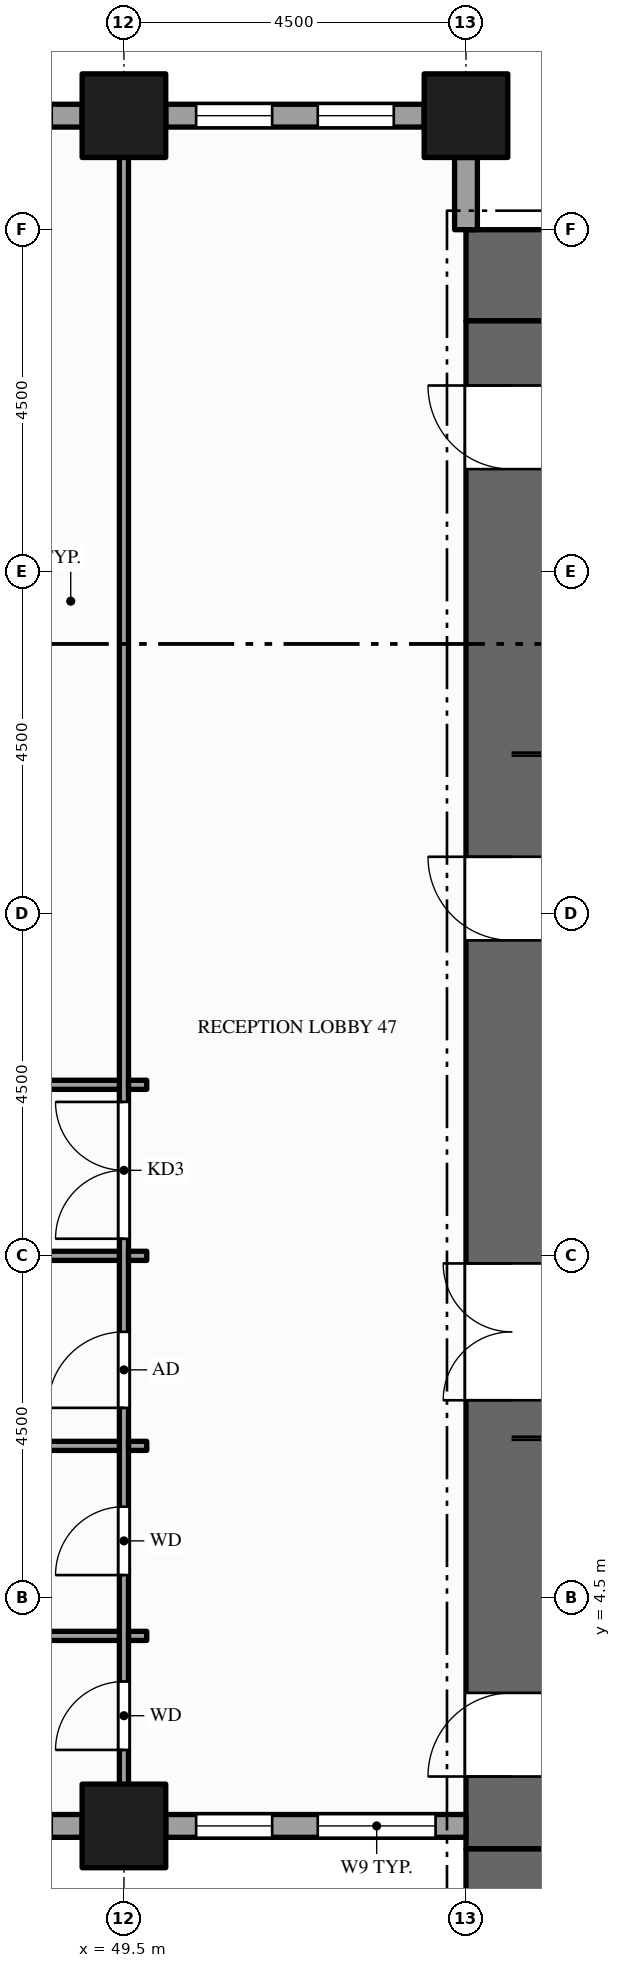
"""IFC4 building model, lengths in metres.
Left out: names, types, materials, properties, quantities, classifications, styles, units other than length and angle.
Written with IfcOpenShell. Run it as: python <this file> out.ifc"""

import sys

from ifc_helpers import new_model, si_unit, direction, frame, frame_2d, origin, origin_2d, place, context, subcontext, project, spatial, rectangle, hollow_rectangle, extrude, element, fill, save


model = new_model("IFC4")
c1 = context("Model", 3, precision=1e-05, world=origin(), true_north=direction((0.0, 1.0)))
c2 = subcontext(c1, "Body", "Model", "MODEL_VIEW")
j1 = project(units=[si_unit("LENGTHUNIT", "METRE"), si_unit("PLANEANGLEUNIT", "RADIAN")], contexts=[c1])
p1 = place(None, origin())
s1 = spatial("IfcSite", under=j1, at=p1, CompositionType="ELEMENT")
p2 = place(p1, origin())
s2 = spatial("IfcBuilding", under=s1, at=p2, CompositionType="ELEMENT")
p3 = place(p2, frame((0.0, 0.0, 33.0)))
s3 = spatial("IfcBuildingStorey", under=s2, at=p3, CompositionType="ELEMENT", Elevation=33.0)
for number, where, z_axis, x_axis in (
    (1, (67.5, 0.6, -0.15), (0.0, 0.0, 1.0), (-1.0, 0.0, 0.0)),
    (2, (54.0, 21.9, -0.15), (0.0, 0.0, 1.0), (1.0, 0.0, 0.0)),
):
    element("IfcWall", number, at=place(p3, frame(where, z_axis=z_axis, x_axis=x_axis)), inside=s3, PredefinedType="SHEAR", context=c2, shape_type="SweptSolid", body=[
        extrude(rectangle(XDim=13.5, YDim=1.2, at=frame_2d((6.75, 0.0))), origin(), (0.0, 0.0, 1.0), 4.0),
    ])
p4 = place(p3, frame((54.6, 1.2, -0.15), z_axis=(0.0, 0.0, 1.0), x_axis=(0.0, 1.0, 0.0)))
e3 = element("IfcWall", 3, at=p4, inside=s3, PredefinedType="SHEAR", context=c2, shape_type="SweptSolid", body=[
    extrude(rectangle(XDim=20.1, YDim=1.2, at=frame_2d((10.05, 0.0))), origin(), (0.0, 0.0, 1.0), 4.0),
])
p5 = place(p4, frame((5.9, 0.0, 0.15)))
e4 = element("IfcOpeningElement", 4, at=p5, cuts=e3, PredefinedType="OPENING", context=c2, shape_type="SweptSolid", body=[
    extrude(rectangle(XDim=1.8, YDim=2.1, at=frame_2d((0.9, 1.05))), frame((0.0, 0.61, 0.0), z_axis=(0.0, -1.0, 0.0), x_axis=(1.0, 0.0, 0.0)), (0.0, 0.0, 1.0), 1.22),
])
p6 = place(p4, frame((11.95, 0.0, 0.15)))
e5 = element("IfcOpeningElement", 5, at=p6, cuts=e3, PredefinedType="OPENING", context=c2, shape_type="SweptSolid", body=[
    extrude(rectangle(XDim=1.1, YDim=2.1, at=frame_2d((0.55, 1.05))), frame((0.0, 0.61, 0.0), z_axis=(0.0, -1.0, 0.0), x_axis=(1.0, 0.0, 0.0)), (0.0, 0.0, 1.0), 1.22),
])
p7 = place(p4, frame((0.95, 0.0, 0.15)))
e6 = element("IfcOpeningElement", 6, at=p7, cuts=e3, PredefinedType="OPENING", context=c2, shape_type="SweptSolid", body=[
    extrude(rectangle(XDim=1.1, YDim=2.1, at=frame_2d((0.55, 1.05))), frame((0.0, 0.61, 0.0), z_axis=(0.0, -1.0, 0.0), x_axis=(1.0, 0.0, 0.0)), (0.0, 0.0, 1.0), 1.22),
])
p8 = place(p4, frame((18.15, 0.0, 0.15)))
e7 = element("IfcOpeningElement", 7, at=p8, cuts=e3, PredefinedType="OPENING", context=c2, shape_type="SweptSolid", body=[
    extrude(rectangle(XDim=1.1, YDim=2.1, at=frame_2d((0.55, 1.05))), frame((0.0, 0.61, 0.0), z_axis=(0.0, -1.0, 0.0), x_axis=(1.0, 0.0, 0.0)), (0.0, 0.0, 1.0), 1.22),
])
for number, where, z_axis, x_axis in (
    (8, (49.5, 1.5, -0.15), (0.0, 0.0, 1.0), (1.0, 0.0, 0.0)),
    (9, (49.5, 24.0, -0.15), (0.0, 0.0, 1.0), (1.0, 0.0, 0.0)),
    (10, (54.0, 24.0, -0.15), (0.0, 0.0, 1.0), (1.0, 0.0, 0.0)),
):
    element("IfcColumn", number, at=place(p3, frame(where, z_axis=z_axis, x_axis=x_axis)), inside=s3, PredefinedType="COLUMN", context=c2, shape_type="SweptSolid", body=[
        extrude(hollow_rectangle(XDim=1.1, YDim=1.1, WallThickness=0.06, at=origin_2d()), origin(), (0.0, 0.0, 1.0), 4.0),
    ])
p9 = place(p3, frame((45.55, 1.5, 0.0), z_axis=(0.0, 0.0, 1.0), x_axis=(1.0, 0.0, 0.0)))
e11 = element("IfcWall", 11, at=p9, inside=s3, PredefinedType="STANDARD", context=c2, shape_type="SweptSolid", body=[
    extrude(rectangle(XDim=3.4, YDim=0.3, at=frame_2d((1.7, 0.0))), origin(), (0.0, 0.0, 1.0), 3.144),
])
p10 = place(p9, frame((0.4, 0.0, 0.9)))
e12 = element("IfcOpeningElement", 12, at=p10, cuts=e11, PredefinedType="OPENING", context=c2, shape_type="SweptSolid", body=[
    extrude(rectangle(XDim=1.0, YDim=2.0, at=frame_2d((0.5, 1.0))), frame((0.0, 0.16, 0.0), z_axis=(0.0, -1.0, 0.0), x_axis=(1.0, 0.0, 0.0)), (0.0, 0.0, 1.0), 0.32),
])
p11 = place(p9, frame((2.0, 0.0, 0.9)))
e13 = element("IfcOpeningElement", 13, at=p11, cuts=e11, PredefinedType="OPENING", context=c2, shape_type="SweptSolid", body=[
    extrude(rectangle(XDim=1.0, YDim=2.0, at=frame_2d((0.5, 1.0))), frame((0.0, 0.16, 0.0), z_axis=(0.0, -1.0, 0.0), x_axis=(1.0, 0.0, 0.0)), (0.0, 0.0, 1.0), 0.32),
])
p12 = place(p3, frame((50.05, 1.5, 0.0), z_axis=(0.0, 0.0, 1.0), x_axis=(1.0, 0.0, 0.0)))
e14 = element("IfcWall", 14, at=p12, inside=s3, PredefinedType="STANDARD", context=c2, shape_type="SweptSolid", body=[
    extrude(rectangle(XDim=3.95, YDim=0.3, at=frame_2d((1.975, 0.0))), origin(), (0.0, 0.0, 1.0), 3.144),
])
p13 = place(p12, frame((0.4, 0.0, 0.9)))
e15 = element("IfcOpeningElement", 15, at=p13, cuts=e14, PredefinedType="OPENING", context=c2, shape_type="SweptSolid", body=[
    extrude(rectangle(XDim=1.0, YDim=2.0, at=frame_2d((0.5, 1.0))), frame((0.0, 0.16, 0.0), z_axis=(0.0, -1.0, 0.0), x_axis=(1.0, 0.0, 0.0)), (0.0, 0.0, 1.0), 0.32),
])
p14 = place(p12, frame((2.0, 0.0, 0.9)))
e16 = element("IfcOpeningElement", 16, at=p14, cuts=e14, PredefinedType="OPENING", context=c2, shape_type="SweptSolid", body=[
    extrude(rectangle(XDim=1.55, YDim=2.0, at=frame_2d((0.775, 1.0))), frame((0.0, 0.16, 0.0), z_axis=(0.0, -1.0, 0.0), x_axis=(1.0, 0.0, 0.0)), (0.0, 0.0, 1.0), 0.32),
])
p15 = place(p3, frame((54.0, 22.5, 0.0), z_axis=(0.0, 0.0, 1.0), x_axis=(0.0, 1.0, 0.0)))
e17 = element("IfcWall", 17, at=p15, inside=s3, PredefinedType="STANDARD", context=c2, shape_type="SweptSolid", body=[
    extrude(rectangle(XDim=0.95, YDim=0.3, at=frame_2d((0.475, 0.0))), origin(), (0.0, 0.0, 1.0), 3.144),
])
p16 = place(p3, frame((53.45, 24.0, 0.0), z_axis=(0.0, 0.0, 1.0), x_axis=(-1.0, 0.0, 0.0)))
e18 = element("IfcWall", 18, at=p16, inside=s3, PredefinedType="STANDARD", context=c2, shape_type="SweptSolid", body=[
    extrude(rectangle(XDim=3.4, YDim=0.3, at=frame_2d((1.7, 0.0))), origin(), (0.0, 0.0, 1.0), 3.144),
])
p17 = place(p16, frame((0.4, 0.0, 0.9)))
e19 = element("IfcOpeningElement", 19, at=p17, cuts=e18, PredefinedType="OPENING", context=c2, shape_type="SweptSolid", body=[
    extrude(rectangle(XDim=1.0, YDim=2.0, at=frame_2d((0.5, 1.0))), frame((0.0, 0.16, 0.0), z_axis=(0.0, -1.0, 0.0), x_axis=(1.0, 0.0, 0.0)), (0.0, 0.0, 1.0), 0.32),
])
p18 = place(p16, frame((2.0, 0.0, 0.9)))
e20 = element("IfcOpeningElement", 20, at=p18, cuts=e18, PredefinedType="OPENING", context=c2, shape_type="SweptSolid", body=[
    extrude(rectangle(XDim=1.0, YDim=2.0, at=frame_2d((0.5, 1.0))), frame((0.0, 0.16, 0.0), z_axis=(0.0, -1.0, 0.0), x_axis=(1.0, 0.0, 0.0)), (0.0, 0.0, 1.0), 0.32),
])
p19 = place(p3, frame((48.95, 24.0, 0.0), z_axis=(0.0, 0.0, 1.0), x_axis=(-1.0, 0.0, 0.0)))
e21 = element("IfcWall", 21, at=p19, inside=s3, PredefinedType="STANDARD", context=c2, shape_type="SweptSolid", body=[
    extrude(rectangle(XDim=3.4, YDim=0.3, at=frame_2d((1.7, 0.0))), origin(), (0.0, 0.0, 1.0), 3.144),
])
p20 = place(p19, frame((0.4, 0.0, 0.9)))
e22 = element("IfcOpeningElement", 22, at=p20, cuts=e21, PredefinedType="OPENING", context=c2, shape_type="SweptSolid", body=[
    extrude(rectangle(XDim=1.0, YDim=2.0, at=frame_2d((0.5, 1.0))), frame((0.0, 0.16, 0.0), z_axis=(0.0, -1.0, 0.0), x_axis=(1.0, 0.0, 0.0)), (0.0, 0.0, 1.0), 0.32),
])
p21 = place(p19, frame((2.0, 0.0, 0.9)))
e23 = element("IfcOpeningElement", 23, at=p21, cuts=e21, PredefinedType="OPENING", context=c2, shape_type="SweptSolid", body=[
    extrude(rectangle(XDim=1.0, YDim=2.0, at=frame_2d((0.5, 1.0))), frame((0.0, 0.16, 0.0), z_axis=(0.0, -1.0, 0.0), x_axis=(1.0, 0.0, 0.0)), (0.0, 0.0, 1.0), 0.32),
])
p22 = place(p3, frame((49.5, 1.65, 0.0), z_axis=(0.0, 0.0, 1.0), x_axis=(0.0, 1.0, 0.0)))
e24 = element("IfcWall", 24, at=p22, inside=s3, PredefinedType="PARTITIONING", context=c2, shape_type="SweptSolid", body=[
    extrude(rectangle(XDim=22.2, YDim=0.12, at=frame_2d((11.1, 0.0))), origin(), (0.0, 0.0, 1.0), 2.938),
])
p23 = place(p22, frame((7.575, 0.0, 0.0)))
e25 = element("IfcOpeningElement", 25, at=p23, cuts=e24, PredefinedType="OPENING", context=c2, shape_type="SweptSolid", body=[
    extrude(rectangle(XDim=1.8, YDim=2.1, at=frame_2d((0.9, 1.05))), frame((0.0, 0.07, 0.0), z_axis=(0.0, -1.0, 0.0), x_axis=(1.0, 0.0, 0.0)), (0.0, 0.0, 1.0), 0.14),
])
p24 = place(p22, frame((0.85, 0.0, 0.0)))
e26 = element("IfcOpeningElement", 26, at=p24, cuts=e24, PredefinedType="OPENING", context=c2, shape_type="SweptSolid", body=[
    extrude(rectangle(XDim=0.9, YDim=2.1, at=frame_2d((0.45, 1.05))), frame((0.0, 0.07, 0.0), z_axis=(0.0, -1.0, 0.0), x_axis=(1.0, 0.0, 0.0)), (0.0, 0.0, 1.0), 0.14),
])
p25 = place(p22, frame((3.15, 0.0, 0.0)))
e27 = element("IfcOpeningElement", 27, at=p25, cuts=e24, PredefinedType="OPENING", context=c2, shape_type="SweptSolid", body=[
    extrude(rectangle(XDim=0.9, YDim=2.1, at=frame_2d((0.45, 1.05))), frame((0.0, 0.07, 0.0), z_axis=(0.0, -1.0, 0.0), x_axis=(1.0, 0.0, 0.0)), (0.0, 0.0, 1.0), 0.14),
])
p26 = place(p22, frame((5.35, 0.0, 0.0)))
e28 = element("IfcOpeningElement", 28, at=p26, cuts=e24, PredefinedType="OPENING", context=c2, shape_type="SweptSolid", body=[
    extrude(rectangle(XDim=1.0, YDim=2.1, at=frame_2d((0.5, 1.05))), frame((0.0, 0.07, 0.0), z_axis=(0.0, -1.0, 0.0), x_axis=(1.0, 0.0, 0.0)), (0.0, 0.0, 1.0), 0.14),
])
p27 = place(p3, frame((45.06, 4.0, 0.0), z_axis=(0.0, 0.0, 1.0), x_axis=(1.0, 0.0, 0.0)))
e29 = element("IfcWall", 29, at=p27, inside=s3, PredefinedType="PARTITIONING", context=c2, shape_type="SweptSolid", body=[
    extrude(rectangle(XDim=4.38, YDim=0.12, at=frame_2d((2.19, 0.0))), origin(), (0.0, 0.0, 1.0), 2.938),
])
p28 = place(p3, frame((49.56, 4.0, 0.0), z_axis=(0.0, 0.0, 1.0), x_axis=(1.0, 0.0, 0.0)))
e30 = element("IfcWall", 30, at=p28, inside=s3, PredefinedType="PARTITIONING", context=c2, shape_type="SweptSolid", body=[
    extrude(rectangle(XDim=0.24, YDim=0.12, at=frame_2d((0.12, 0.0))), origin(), (0.0, 0.0, 1.0), 2.938),
])
p29 = place(p3, frame((45.06, 6.5, 0.0), z_axis=(0.0, 0.0, 1.0), x_axis=(1.0, 0.0, 0.0)))
e31 = element("IfcWall", 31, at=p29, inside=s3, PredefinedType="PARTITIONING", context=c2, shape_type="SweptSolid", body=[
    extrude(rectangle(XDim=4.38, YDim=0.12, at=frame_2d((2.19, 0.0))), origin(), (0.0, 0.0, 1.0), 2.938),
])
p30 = place(p3, frame((49.56, 6.5, 0.0), z_axis=(0.0, 0.0, 1.0), x_axis=(1.0, 0.0, 0.0)))
e32 = element("IfcWall", 32, at=p30, inside=s3, PredefinedType="PARTITIONING", context=c2, shape_type="SweptSolid", body=[
    extrude(rectangle(XDim=0.24, YDim=0.12, at=frame_2d((0.12, 0.0))), origin(), (0.0, 0.0, 1.0), 2.938),
])
p31 = place(p3, frame((45.06, 9.0, 0.0), z_axis=(0.0, 0.0, 1.0), x_axis=(1.0, 0.0, 0.0)))
e33 = element("IfcWall", 33, at=p31, inside=s3, PredefinedType="PARTITIONING", context=c2, shape_type="SweptSolid", body=[
    extrude(rectangle(XDim=4.38, YDim=0.12, at=frame_2d((2.19, 0.0))), origin(), (0.0, 0.0, 1.0), 2.938),
])
p32 = place(p3, frame((49.56, 9.0, 0.0), z_axis=(0.0, 0.0, 1.0), x_axis=(1.0, 0.0, 0.0)))
e34 = element("IfcWall", 34, at=p32, inside=s3, PredefinedType="PARTITIONING", context=c2, shape_type="SweptSolid", body=[
    extrude(rectangle(XDim=0.24, YDim=0.12, at=frame_2d((0.12, 0.0))), origin(), (0.0, 0.0, 1.0), 2.938),
])
p33 = place(p3, frame((45.06, 11.25, 0.0), z_axis=(0.0, 0.0, 1.0), x_axis=(1.0, 0.0, 0.0)))
e35 = element("IfcWall", 35, at=p33, inside=s3, PredefinedType="PARTITIONING", context=c2, shape_type="SweptSolid", body=[
    extrude(rectangle(XDim=4.38, YDim=0.12, at=frame_2d((2.19, 0.0))), origin(), (0.0, 0.0, 1.0), 2.938),
])
p34 = place(p33, frame((1.59, 0.0, 0.0)))
e36 = element("IfcOpeningElement", 36, at=p34, cuts=e35, PredefinedType="OPENING", context=c2, shape_type="SweptSolid", body=[
    extrude(rectangle(XDim=1.2, YDim=2.1, at=frame_2d((0.6, 1.05))), frame((0.0, 0.07, 0.0), z_axis=(0.0, -1.0, 0.0), x_axis=(1.0, 0.0, 0.0)), (0.0, 0.0, 1.0), 0.14),
])
p35 = place(p3, frame((49.56, 11.25, 0.0), z_axis=(0.0, 0.0, 1.0), x_axis=(1.0, 0.0, 0.0)))
e37 = element("IfcWall", 37, at=p35, inside=s3, PredefinedType="PARTITIONING", context=c2, shape_type="SweptSolid", body=[
    extrude(rectangle(XDim=0.24, YDim=0.12, at=frame_2d((0.12, 0.0))), origin(), (0.0, 0.0, 1.0), 2.938),
])
p36 = place(p13, origin())
e38 = element("IfcWindow", 38, at=p36, inside=s3, PartitioningType="SINGLE_PANEL", PredefinedType="WINDOW", context=c2, shape_type="SweptSolid", body=[
    extrude(rectangle(XDim=1.0, YDim=2.0, at=frame_2d((0.5, 1.0))), frame((0.0, 0.03, 0.0), z_axis=(0.0, -1.0, 0.0), x_axis=(1.0, 0.0, 0.0)), (0.0, 0.0, 1.0), 0.06),
])
fill(e15, e38)
p37 = place(p14, origin())
e39 = element("IfcWindow", 39, at=p37, inside=s3, PartitioningType="SINGLE_PANEL", PredefinedType="WINDOW", context=c2, shape_type="SweptSolid", body=[
    extrude(rectangle(XDim=1.55, YDim=2.0, at=frame_2d((0.775, 1.0))), frame((0.0, 0.03, 0.0), z_axis=(0.0, -1.0, 0.0), x_axis=(1.0, 0.0, 0.0)), (0.0, 0.0, 1.0), 0.06),
])
fill(e16, e39)
p38 = place(p17, origin())
e40 = element("IfcWindow", 40, at=p38, inside=s3, PartitioningType="SINGLE_PANEL", PredefinedType="WINDOW", context=c2, shape_type="SweptSolid", body=[
    extrude(rectangle(XDim=1.0, YDim=2.0, at=frame_2d((0.5, 1.0))), frame((0.0, 0.03, 0.0), z_axis=(0.0, -1.0, 0.0), x_axis=(1.0, 0.0, 0.0)), (0.0, 0.0, 1.0), 0.06),
])
fill(e19, e40)
p39 = place(p18, origin())
e41 = element("IfcWindow", 41, at=p39, inside=s3, PartitioningType="SINGLE_PANEL", PredefinedType="WINDOW", context=c2, shape_type="SweptSolid", body=[
    extrude(rectangle(XDim=1.0, YDim=2.0, at=frame_2d((0.5, 1.0))), frame((0.0, 0.03, 0.0), z_axis=(0.0, -1.0, 0.0), x_axis=(1.0, 0.0, 0.0)), (0.0, 0.0, 1.0), 0.06),
])
fill(e20, e41)
p40 = place(p5, origin())
e42 = element("IfcDoor", 42, at=p40, inside=s3, OperationType="DOUBLE_DOOR_SINGLE_SWING", PredefinedType="DOOR", context=c2, shape_type="SweptSolid", body=[
    extrude(rectangle(XDim=1.8, YDim=2.1, at=frame_2d((0.9, 1.05))), frame((0.0, 0.025, 0.0), z_axis=(0.0, -1.0, 0.0), x_axis=(1.0, 0.0, 0.0)), (0.0, 0.0, 1.0), 0.05),
])
fill(e4, e42)
p41 = place(p6, origin())
e43 = element("IfcDoor", 43, at=p41, inside=s3, OperationType="SINGLE_SWING_RIGHT", PredefinedType="DOOR", context=c2, shape_type="SweptSolid", body=[
    extrude(rectangle(XDim=1.1, YDim=2.1, at=frame_2d((0.55, 1.05))), frame((0.0, 0.025, 0.0), z_axis=(0.0, -1.0, 0.0), x_axis=(1.0, 0.0, 0.0)), (0.0, 0.0, 1.0), 0.05),
])
fill(e5, e43)
p42 = place(p7, origin())
e44 = element("IfcDoor", 44, at=p42, inside=s3, OperationType="SINGLE_SWING_LEFT", PredefinedType="DOOR", context=c2, shape_type="SweptSolid", body=[
    extrude(rectangle(XDim=1.1, YDim=2.1, at=frame_2d((0.55, 1.05))), frame((0.0, 0.025, 0.0), z_axis=(0.0, -1.0, 0.0), x_axis=(1.0, 0.0, 0.0)), (0.0, 0.0, 1.0), 0.05),
])
fill(e6, e44)
p43 = place(p8, origin())
e45 = element("IfcDoor", 45, at=p43, inside=s3, OperationType="SINGLE_SWING_RIGHT", PredefinedType="DOOR", context=c2, shape_type="SweptSolid", body=[
    extrude(rectangle(XDim=1.1, YDim=2.1, at=frame_2d((0.55, 1.05))), frame((0.0, 0.025, 0.0), z_axis=(0.0, -1.0, 0.0), x_axis=(1.0, 0.0, 0.0)), (0.0, 0.0, 1.0), 0.05),
])
fill(e7, e45)
p44 = place(p23, origin())
e46 = element("IfcDoor", 46, at=p44, inside=s3, OperationType="DOUBLE_DOOR_SINGLE_SWING", PredefinedType="DOOR", context=c2, shape_type="SweptSolid", body=[
    extrude(rectangle(XDim=1.8, YDim=2.1, at=frame_2d((0.9, 1.05))), frame((0.0, 0.025, 0.0), z_axis=(0.0, -1.0, 0.0), x_axis=(1.0, 0.0, 0.0)), (0.0, 0.0, 1.0), 0.05),
])
fill(e25, e46)
p45 = place(p24, origin())
e47 = element("IfcDoor", 47, at=p45, inside=s3, OperationType="SINGLE_SWING_LEFT", PredefinedType="DOOR", context=c2, shape_type="SweptSolid", body=[
    extrude(rectangle(XDim=0.9, YDim=2.1, at=frame_2d((0.45, 1.05))), frame((0.0, 0.025, 0.0), z_axis=(0.0, -1.0, 0.0), x_axis=(1.0, 0.0, 0.0)), (0.0, 0.0, 1.0), 0.05),
])
fill(e26, e47)
p46 = place(p25, origin())
e48 = element("IfcDoor", 48, at=p46, inside=s3, OperationType="SINGLE_SWING_LEFT", PredefinedType="DOOR", context=c2, shape_type="SweptSolid", body=[
    extrude(rectangle(XDim=0.9, YDim=2.1, at=frame_2d((0.45, 1.05))), frame((0.0, 0.025, 0.0), z_axis=(0.0, -1.0, 0.0), x_axis=(1.0, 0.0, 0.0)), (0.0, 0.0, 1.0), 0.05),
])
fill(e27, e48)
p47 = place(p26, origin())
e49 = element("IfcDoor", 49, at=p47, inside=s3, OperationType="SINGLE_SWING_LEFT", PredefinedType="DOOR", context=c2, shape_type="SweptSolid", body=[
    extrude(rectangle(XDim=1.0, YDim=2.1, at=frame_2d((0.5, 1.05))), frame((0.0, 0.025, 0.0), z_axis=(0.0, -1.0, 0.0), x_axis=(1.0, 0.0, 0.0)), (0.0, 0.0, 1.0), 0.05),
])
fill(e28, e49)
save(model, sys.argv[1])
